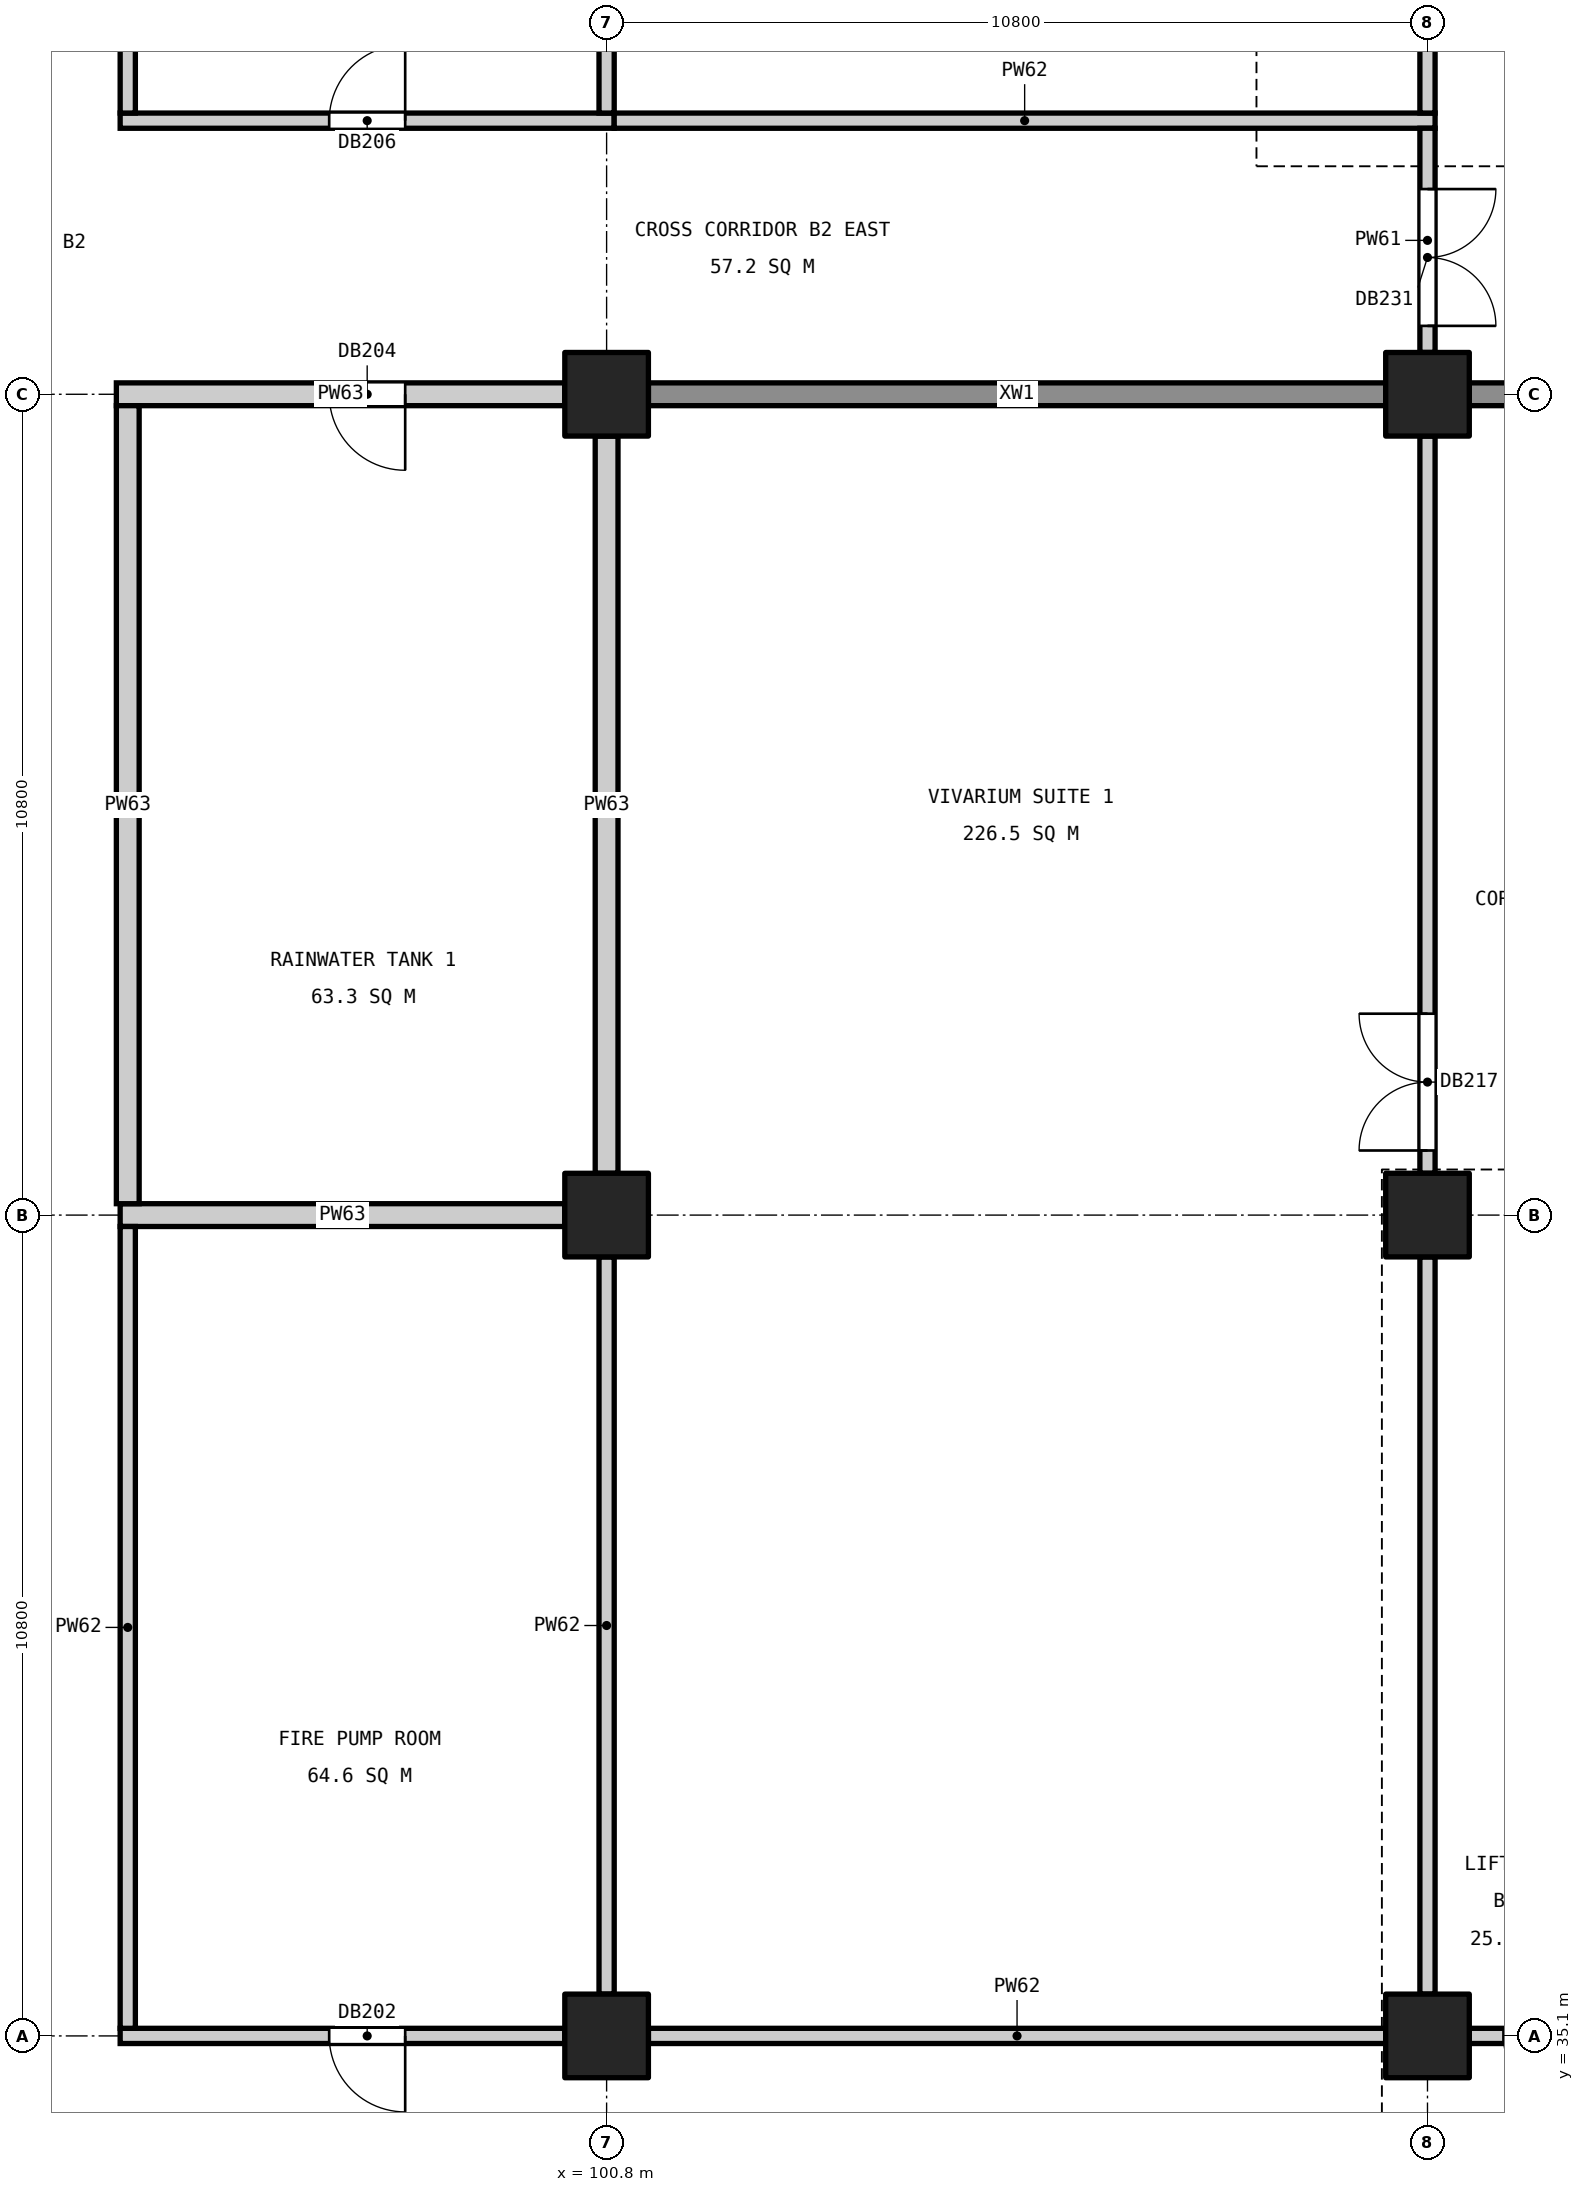
"""IFC4 building model, lengths in metres.
Left out: names, types, materials, properties, quantities, classifications, styles, units other than length and angle.
Written with IfcOpenShell. Run it as: python <this file> out.ifc"""

import sys

from ifc_helpers import new_model, si_unit, direction, frame, frame_2d, origin, origin_2d, place, context, subcontext, project, spatial, rectangle, extrude, element, fill, save


model = new_model("IFC4")
c1 = context("Model", 3, precision=1e-05, world=origin(), true_north=direction((0.0, 1.0)))
c2 = subcontext(c1, "Body", "Model", "MODEL_VIEW")
j1 = project(units=[si_unit("LENGTHUNIT", "METRE"), si_unit("PLANEANGLEUNIT", "RADIAN")], contexts=[c1])
p1 = place(None, origin())
s1 = spatial("IfcSite", under=j1, at=p1, CompositionType="ELEMENT")
p2 = place(p1, origin())
s2 = spatial("IfcBuilding", under=s1, at=p2, CompositionType="ELEMENT")
p3 = place(p2, frame((0.0, 0.0, -9.6)))
s3 = spatial("IfcBuildingStorey", under=s2, at=p3, CompositionType="ELEMENT", Elevation=-9.6)
for number, where, z_axis, x_axis in (
    (1, (111.6, 35.1, 0.0), (0.0, 0.0, 1.0), (1.0, 0.0, 0.0)),
    (2, (111.6, 45.9, 0.0), (0.0, 0.0, 1.0), (1.0, 0.0, 0.0)),
    (3, (111.6, 56.7, 0.0), (0.0, 0.0, 1.0), (1.0, 0.0, 0.0)),
    (4, (100.8, 35.1, 0.0), (0.0, 0.0, 1.0), (1.0, 0.0, 0.0)),
    (5, (100.8, 45.9, 0.0), (0.0, 0.0, 1.0), (1.0, 0.0, 0.0)),
    (6, (100.8, 56.7, 0.0), (0.0, 0.0, 1.0), (1.0, 0.0, 0.0)),
):
    element("IfcColumn", number, at=place(p3, frame(where, z_axis=z_axis, x_axis=x_axis)), inside=s3, PredefinedType="COLUMN", context=c2, shape_type="SweptSolid", body=[
        extrude(rectangle(XDim=1.1, YDim=1.1, at=origin_2d()), origin(), (0.0, 0.0, 1.0), 4.35),
    ])
p4 = place(p3, frame((118.25, 56.7, 0.0), z_axis=(0.0, 0.0, 1.0), x_axis=(-1.0, 0.0, 0.0)))
e7 = element("IfcWall", 7, at=p4, inside=s3, PredefinedType="SHEAR", context=c2, shape_type="SweptSolid", body=[
    extrude(rectangle(XDim=6.1, YDim=0.3, at=frame_2d((3.05, 0.0))), origin(), (0.0, 0.0, 1.0), 4.35),
])
p5 = place(p4, frame((2.15, 0.0, 0.0)))
e8 = element("IfcOpeningElement", 8, at=p5, cuts=e7, PredefinedType="OPENING", context=c2, shape_type="SweptSolid", body=[
    extrude(rectangle(XDim=1.8, YDim=2.1, at=frame_2d((0.9, 1.05))), frame((0.0, 0.16, 0.0), z_axis=(0.0, -1.0, 0.0), x_axis=(1.0, 0.0, 0.0)), (0.0, 0.0, 1.0), 0.32),
])
p6 = place(p3, frame((111.05, 56.7, 0.0), z_axis=(0.0, 0.0, 1.0), x_axis=(-1.0, 0.0, 0.0)))
e9 = element("IfcWall", 9, at=p6, inside=s3, PredefinedType="SHEAR", context=c2, shape_type="SweptSolid", body=[
    extrude(rectangle(XDim=9.7, YDim=0.3, at=frame_2d((4.85, 0.0))), origin(), (0.0, 0.0, 1.0), 4.35),
])
p7 = place(p3, frame((94.4, 35.1, 0.0), z_axis=(0.0, 0.0, 1.0), x_axis=(1.0, 0.0, 0.0)))
e10 = element("IfcWall", 10, at=p7, inside=s3, PredefinedType="PARTITIONING", context=c2, shape_type="SweptSolid", body=[
    extrude(rectangle(XDim=5.85, YDim=0.2, at=frame_2d((2.925, 0.0))), origin(), (0.0, 0.0, 1.0), 4.35),
])
p8 = place(p7, frame((2.75, 0.0, 0.0)))
e11 = element("IfcOpeningElement", 11, at=p8, cuts=e10, PredefinedType="OPENING", context=c2, shape_type="SweptSolid", body=[
    extrude(rectangle(XDim=1.0, YDim=2.1, at=frame_2d((0.5, 1.05))), frame((0.0, 0.11, 0.0), z_axis=(0.0, -1.0, 0.0), x_axis=(1.0, 0.0, 0.0)), (0.0, 0.0, 1.0), 0.22),
])
p9 = place(p3, frame((101.35, 35.1, 0.0), z_axis=(0.0, 0.0, 1.0), x_axis=(1.0, 0.0, 0.0)))
e12 = element("IfcWall", 12, at=p9, inside=s3, PredefinedType="PARTITIONING", context=c2, shape_type="SweptSolid", body=[
    extrude(rectangle(XDim=9.7, YDim=0.2, at=frame_2d((4.85, 0.0))), origin(), (0.0, 0.0, 1.0), 4.35),
])
p10 = place(p3, frame((112.15, 35.1, 0.0), z_axis=(0.0, 0.0, 1.0), x_axis=(1.0, 0.0, 0.0)))
e13 = element("IfcWall", 13, at=p10, inside=s3, PredefinedType="PARTITIONING", context=c2, shape_type="SweptSolid", body=[
    extrude(rectangle(XDim=1.9, YDim=0.2, at=frame_2d((0.95, 0.0))), origin(), (0.0, 0.0, 1.0), 4.35),
])
p11 = place(p10, frame((0.45, 0.0, 0.0)))
e14 = element("IfcOpeningElement", 14, at=p11, cuts=e13, PredefinedType="OPENING", context=c2, shape_type="SweptSolid", body=[
    extrude(rectangle(XDim=1.0, YDim=2.1, at=frame_2d((0.5, 1.05))), frame((0.0, 0.11, 0.0), z_axis=(0.0, -1.0, 0.0), x_axis=(1.0, 0.0, 0.0)), (0.0, 0.0, 1.0), 0.22),
])
p12 = place(p3, frame((94.4, 45.9, 0.0), z_axis=(0.0, 0.0, 1.0), x_axis=(1.0, 0.0, 0.0)))
e15 = element("IfcWall", 15, at=p12, inside=s3, PredefinedType="SOLIDWALL", context=c2, shape_type="SweptSolid", body=[
    extrude(rectangle(XDim=5.85, YDim=0.3, at=frame_2d((2.925, 0.0))), origin(), (0.0, 0.0, 1.0), 4.35),
])
p13 = place(p3, frame((94.35, 56.7, 0.0), z_axis=(0.0, 0.0, 1.0), x_axis=(1.0, 0.0, 0.0)))
e16 = element("IfcWall", 16, at=p13, inside=s3, PredefinedType="SOLIDWALL", context=c2, shape_type="SweptSolid", body=[
    extrude(rectangle(XDim=5.9, YDim=0.3, at=frame_2d((2.95, 0.0))), origin(), (0.0, 0.0, 1.0), 4.35),
])
p14 = place(p13, frame((2.8, 0.0, 0.0)))
e17 = element("IfcOpeningElement", 17, at=p14, cuts=e16, PredefinedType="OPENING", context=c2, shape_type="SweptSolid", body=[
    extrude(rectangle(XDim=1.0, YDim=2.1, at=frame_2d((0.5, 1.05))), frame((0.0, 0.16, 0.0), z_axis=(0.0, -1.0, 0.0), x_axis=(1.0, 0.0, 0.0)), (0.0, 0.0, 1.0), 0.32),
])
p15 = place(p3, frame((94.4, 60.3, 0.0), z_axis=(0.0, 0.0, 1.0), x_axis=(1.0, 0.0, 0.0)))
e18 = element("IfcWall", 18, at=p15, inside=s3, PredefinedType="PARTITIONING", context=c2, shape_type="SweptSolid", body=[
    extrude(rectangle(XDim=6.5, YDim=0.2, at=frame_2d((3.25, 0.0))), origin(), (0.0, 0.0, 1.0), 4.35),
])
p16 = place(p15, frame((2.75, 0.0, 0.0)))
e19 = element("IfcOpeningElement", 19, at=p16, cuts=e18, PredefinedType="OPENING", context=c2, shape_type="SweptSolid", body=[
    extrude(rectangle(XDim=1.0, YDim=2.1, at=frame_2d((0.5, 1.05))), frame((0.0, 0.11, 0.0), z_axis=(0.0, -1.0, 0.0), x_axis=(1.0, 0.0, 0.0)), (0.0, 0.0, 1.0), 0.22),
])
p17 = place(p3, frame((100.9, 60.3, 0.0), z_axis=(0.0, 0.0, 1.0), x_axis=(1.0, 0.0, 0.0)))
e20 = element("IfcWall", 20, at=p17, inside=s3, PredefinedType="PARTITIONING", context=c2, shape_type="SweptSolid", body=[
    extrude(rectangle(XDim=10.8, YDim=0.2, at=frame_2d((5.4, 0.0))), origin(), (0.0, 0.0, 1.0), 4.35),
])
p18 = place(p3, frame((94.5, 35.2, 0.0), z_axis=(0.0, 0.0, 1.0), x_axis=(0.0, 1.0, 0.0)))
e21 = element("IfcWall", 21, at=p18, inside=s3, PredefinedType="PARTITIONING", context=c2, shape_type="SweptSolid", body=[
    extrude(rectangle(XDim=10.55, YDim=0.2, at=frame_2d((5.275, 0.0))), origin(), (0.0, 0.0, 1.0), 4.35),
])
p19 = place(p3, frame((94.5, 46.05, 0.0), z_axis=(0.0, 0.0, 1.0), x_axis=(0.0, 1.0, 0.0)))
e22 = element("IfcWall", 22, at=p19, inside=s3, PredefinedType="SOLIDWALL", context=c2, shape_type="SweptSolid", body=[
    extrude(rectangle(XDim=10.5, YDim=0.3, at=frame_2d((5.25, 0.0))), origin(), (0.0, 0.0, 1.0), 4.35),
])
p20 = place(p3, frame((94.5, 60.4, 0.0), z_axis=(0.0, 0.0, 1.0), x_axis=(0.0, 1.0, 0.0)))
e23 = element("IfcWall", 23, at=p20, inside=s3, PredefinedType="PARTITIONING", context=c2, shape_type="SweptSolid", body=[
    extrude(rectangle(XDim=8.8, YDim=0.2, at=frame_2d((4.4, 0.0))), origin(), (0.0, 0.0, 1.0), 4.35),
])
p21 = place(p3, frame((100.8, 35.65, 0.0), z_axis=(0.0, 0.0, 1.0), x_axis=(0.0, 1.0, 0.0)))
e24 = element("IfcWall", 24, at=p21, inside=s3, PredefinedType="PARTITIONING", context=c2, shape_type="SweptSolid", body=[
    extrude(rectangle(XDim=9.7, YDim=0.2, at=frame_2d((4.85, 0.0))), origin(), (0.0, 0.0, 1.0), 4.35),
])
p22 = place(p3, frame((100.8, 46.45, 0.0), z_axis=(0.0, 0.0, 1.0), x_axis=(0.0, 1.0, 0.0)))
e25 = element("IfcWall", 25, at=p22, inside=s3, PredefinedType="SOLIDWALL", context=c2, shape_type="SweptSolid", body=[
    extrude(rectangle(XDim=9.7, YDim=0.3, at=frame_2d((4.85, 0.0))), origin(), (0.0, 0.0, 1.0), 4.35),
])
p23 = place(p3, frame((100.8, 60.4, 0.0), z_axis=(0.0, 0.0, 1.0), x_axis=(0.0, 1.0, 0.0)))
e26 = element("IfcWall", 26, at=p23, inside=s3, PredefinedType="PARTITIONING", context=c2, shape_type="SweptSolid", body=[
    extrude(rectangle(XDim=6.55, YDim=0.2, at=frame_2d((3.275, 0.0))), origin(), (0.0, 0.0, 1.0), 4.35),
])
p24 = place(p3, frame((111.6, 35.65, 0.0), z_axis=(0.0, 0.0, 1.0), x_axis=(0.0, 1.0, 0.0)))
e27 = element("IfcWall", 27, at=p24, inside=s3, PredefinedType="PARTITIONING", context=c2, shape_type="SweptSolid", body=[
    extrude(rectangle(XDim=9.7, YDim=0.2, at=frame_2d((4.85, 0.0))), origin(), (0.0, 0.0, 1.0), 4.35),
])
p25 = place(p3, frame((111.6, 46.45, 0.0), z_axis=(0.0, 0.0, 1.0), x_axis=(0.0, 1.0, 0.0)))
e28 = element("IfcWall", 28, at=p25, inside=s3, PredefinedType="PARTITIONING", context=c2, shape_type="SweptSolid", body=[
    extrude(rectangle(XDim=9.7, YDim=0.2, at=frame_2d((4.85, 0.0))), origin(), (0.0, 0.0, 1.0), 4.35),
])
p26 = place(p25, frame((0.3, 0.0, 0.0)))
e29 = element("IfcOpeningElement", 29, at=p26, cuts=e28, PredefinedType="OPENING", context=c2, shape_type="SweptSolid", body=[
    extrude(rectangle(XDim=1.8, YDim=2.1, at=frame_2d((0.9, 1.05))), frame((0.0, 0.11, 0.0), z_axis=(0.0, -1.0, 0.0), x_axis=(1.0, 0.0, 0.0)), (0.0, 0.0, 1.0), 0.22),
])
p27 = place(p3, frame((111.6, 57.25, 0.0), z_axis=(0.0, 0.0, 1.0), x_axis=(0.0, 1.0, 0.0)))
e30 = element("IfcWall", 30, at=p27, inside=s3, PredefinedType="PARTITIONING", context=c2, shape_type="SweptSolid", body=[
    extrude(rectangle(XDim=2.95, YDim=0.2, at=frame_2d((1.475, 0.0))), origin(), (0.0, 0.0, 1.0), 4.35),
])
p28 = place(p27, frame((0.35, 0.0, 0.0)))
e31 = element("IfcOpeningElement", 31, at=p28, cuts=e30, PredefinedType="OPENING", context=c2, shape_type="SweptSolid", body=[
    extrude(rectangle(XDim=1.8, YDim=2.1, at=frame_2d((0.9, 1.05))), frame((0.0, 0.11, 0.0), z_axis=(0.0, -1.0, 0.0), x_axis=(1.0, 0.0, 0.0)), (0.0, 0.0, 1.0), 0.22),
])
p29 = place(p3, frame((111.6, 60.4, 0.0), z_axis=(0.0, 0.0, 1.0), x_axis=(0.0, 1.0, 0.0)))
e32 = element("IfcWall", 32, at=p29, inside=s3, PredefinedType="PARTITIONING", context=c2, shape_type="SweptSolid", body=[
    extrude(rectangle(XDim=6.55, YDim=0.2, at=frame_2d((3.275, 0.0))), origin(), (0.0, 0.0, 1.0), 4.35),
])
p30 = place(p8, frame((1.0, 0.0, 0.0), z_axis=(0.0, 0.0, 1.0), x_axis=(-1.0, 0.0, 0.0)))
e33 = element("IfcDoor", 33, at=p30, inside=s3, OperationType="SINGLE_SWING_LEFT", PredefinedType="DOOR", context=c2, shape_type="SweptSolid", body=[
    extrude(rectangle(XDim=1.0, YDim=2.1, at=frame_2d((0.5, 1.05))), frame((0.0, 0.025, 0.0), z_axis=(0.0, -1.0, 0.0), x_axis=(1.0, 0.0, 0.0)), (0.0, 0.0, 1.0), 0.05),
])
fill(e11, e33)
p31 = place(p14, frame((1.0, 0.0, 0.0), z_axis=(0.0, 0.0, 1.0), x_axis=(-1.0, 0.0, 0.0)))
e34 = element("IfcDoor", 34, at=p31, inside=s3, OperationType="SINGLE_SWING_LEFT", PredefinedType="DOOR", context=c2, shape_type="SweptSolid", body=[
    extrude(rectangle(XDim=1.0, YDim=2.1, at=frame_2d((0.5, 1.05))), frame((0.0, 0.025, 0.0), z_axis=(0.0, -1.0, 0.0), x_axis=(1.0, 0.0, 0.0)), (0.0, 0.0, 1.0), 0.05),
])
fill(e17, e34)
p32 = place(p16, origin())
e35 = element("IfcDoor", 35, at=p32, inside=s3, OperationType="SINGLE_SWING_RIGHT", PredefinedType="DOOR", context=c2, shape_type="SweptSolid", body=[
    extrude(rectangle(XDim=1.0, YDim=2.1, at=frame_2d((0.5, 1.05))), frame((0.0, 0.025, 0.0), z_axis=(0.0, -1.0, 0.0), x_axis=(1.0, 0.0, 0.0)), (0.0, 0.0, 1.0), 0.05),
])
fill(e19, e35)
p33 = place(p26, origin())
e36 = element("IfcDoor", 36, at=p33, inside=s3, OperationType="DOUBLE_DOOR_SINGLE_SWING", PredefinedType="DOOR", context=c2, shape_type="SweptSolid", body=[
    extrude(rectangle(XDim=1.8, YDim=2.1, at=frame_2d((0.9, 1.05))), frame((0.0, 0.025, 0.0), z_axis=(0.0, -1.0, 0.0), x_axis=(1.0, 0.0, 0.0)), (0.0, 0.0, 1.0), 0.05),
])
fill(e29, e36)
p34 = place(p11, frame((1.0, 0.0, 0.0), z_axis=(0.0, 0.0, 1.0), x_axis=(-1.0, 0.0, 0.0)))
e37 = element("IfcDoor", 37, at=p34, inside=s3, OperationType="SINGLE_SWING_LEFT", PredefinedType="DOOR", context=c2, shape_type="SweptSolid", body=[
    extrude(rectangle(XDim=1.0, YDim=2.1, at=frame_2d((0.5, 1.05))), frame((0.0, 0.025, 0.0), z_axis=(0.0, -1.0, 0.0), x_axis=(1.0, 0.0, 0.0)), (0.0, 0.0, 1.0), 0.05),
])
fill(e14, e37)
p35 = place(p28, frame((1.8, 0.0, 0.0), z_axis=(0.0, 0.0, 1.0), x_axis=(-1.0, 0.0, 0.0)))
e38 = element("IfcDoor", 38, at=p35, inside=s3, OperationType="DOUBLE_DOOR_SINGLE_SWING", PredefinedType="DOOR", context=c2, shape_type="SweptSolid", body=[
    extrude(rectangle(XDim=1.8, YDim=2.1, at=frame_2d((0.9, 1.05))), frame((0.0, 0.025, 0.0), z_axis=(0.0, -1.0, 0.0), x_axis=(1.0, 0.0, 0.0)), (0.0, 0.0, 1.0), 0.05),
])
fill(e31, e38)
save(model, sys.argv[1])
